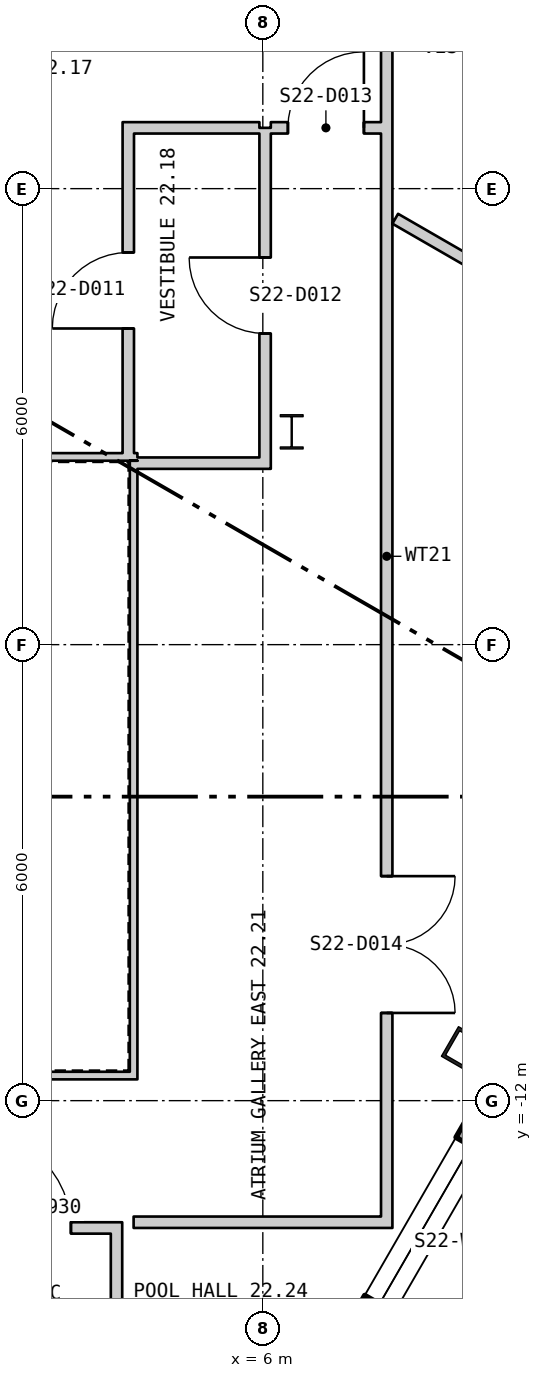
"""IFC4 building model, lengths in metres.
Left out: names, types, materials, properties, quantities, classifications, styles, units other than length and angle.
Written with IfcOpenShell. Run it as: python <this file> out.ifc"""

import sys

from ifc_helpers import new_model, si_unit, direction, frame, frame_2d, origin, origin_2d, place, context, subcontext, project, spatial, polyline, rectangle, hollow_rectangle, i_section, outline, extrude, element, fill, save


model = new_model("IFC4")
c1 = context("Model", 3, precision=1e-05, world=origin(), true_north=direction((0.0, 1.0)))
c2 = subcontext(c1, "Body", "Model", "MODEL_VIEW")
j1 = project(units=[si_unit("LENGTHUNIT", "METRE"), si_unit("PLANEANGLEUNIT", "RADIAN")], contexts=[c1])
p1 = place(None, origin())
s1 = spatial("IfcSite", under=j1, at=p1, CompositionType="ELEMENT")
p2 = place(p1, origin())
s2 = spatial("IfcBuilding", under=s1, at=p2, CompositionType="ELEMENT")
p3 = place(p2, frame((0.0, 0.0, 298.2)))
s3 = spatial("IfcBuildingStorey", under=s2, at=p3, CompositionType="ELEMENT", Elevation=298.2)
p4 = place(p3, frame((8.765, -11.396, 0.0), z_axis=(0.0, 0.0, 1.0), x_axis=(0.5, 0.866025403784, 0.0)))
e1 = element("IfcColumn", 1, at=p4, inside=s3, PredefinedType="COLUMN", context=c2, shape_type="SweptSolid", body=[
    extrude(hollow_rectangle(XDim=0.45, YDim=0.7, WallThickness=0.04, at=origin_2d()), origin(), (0.0, 0.0, 1.0), 6.0),
])
p5 = place(p3, frame((6.38, -3.2, 0.0), z_axis=(0.0, 0.0, 1.0), x_axis=(1.0, 0.0, 0.0)))
e2 = element("IfcColumn", 2, at=p5, inside=s3, PredefinedType="COLUMN", context=c2, shape_type="SweptSolid", body=[
    extrude(i_section(OverallWidth=0.3, OverallDepth=0.45, WebThickness=0.014, FlangeThickness=0.026, at=origin_2d()), origin(), (0.0, 0.0, 1.0), 6.0),
])
p6 = place(p3, frame((2.335, -23.682, -0.28), z_axis=(0.0, 0.0, 1.0), x_axis=(0.499999764979, 0.866025539474, 0.0)))
e3 = element("IfcWall", 3, at=p6, inside=s3, PredefinedType="SOLIDWALL", context=c2, shape_type="SweptSolid", body=[
    extrude(outline(polyline([(-0.13, -0.225), (45.87, -0.225), (45.61, 0.225), (0.13, 0.225), (-0.13, -0.225)])), origin(), (0.0, 0.0, 1.0), 6.1),
])
p7 = place(p6, frame((1.424, 0.0, 1.18)))
e4 = element("IfcOpeningElement", 4, at=p7, cuts=e3, PredefinedType="OPENING", context=c2, shape_type="SweptSolid", body=[
    extrude(rectangle(XDim=2.4, YDim=4.1, at=frame_2d((1.2, 2.05))), frame((0.0, 0.235, 0.0), z_axis=(0.0, -1.0, 0.0), x_axis=(1.0, 0.0, 0.0)), (0.0, 0.0, 1.0), 0.47),
])
p8 = place(p6, frame((5.893, 0.0, 1.18)))
e5 = element("IfcOpeningElement", 5, at=p8, cuts=e3, PredefinedType="OPENING", context=c2, shape_type="SweptSolid", body=[
    extrude(rectangle(XDim=2.4, YDim=4.1, at=frame_2d((1.2, 2.05))), frame((0.0, 0.235, 0.0), z_axis=(0.0, -1.0, 0.0), x_axis=(1.0, 0.0, 0.0)), (0.0, 0.0, 1.0), 0.47),
])
p9 = place(p6, frame((10.401, 0.0, 1.18)))
e6 = element("IfcOpeningElement", 6, at=p9, cuts=e3, PredefinedType="OPENING", context=c2, shape_type="SweptSolid", body=[
    extrude(rectangle(XDim=2.4, YDim=4.1, at=frame_2d((1.2, 2.05))), frame((0.0, 0.235, 0.0), z_axis=(0.0, -1.0, 0.0), x_axis=(1.0, 0.0, 0.0)), (0.0, 0.0, 1.0), 0.47),
])
p10 = place(p6, frame((14.909, 0.0, 1.18)))
e7 = element("IfcOpeningElement", 7, at=p10, cuts=e3, PredefinedType="OPENING", context=c2, shape_type="SweptSolid", body=[
    extrude(rectangle(XDim=2.4, YDim=4.1, at=frame_2d((1.2, 2.05))), frame((0.0, 0.235, 0.0), z_axis=(0.0, -1.0, 0.0), x_axis=(1.0, 0.0, 0.0)), (0.0, 0.0, 1.0), 0.47),
])
p11 = place(p6, frame((19.716, 0.0, 0.28)))
e8 = element("IfcOpeningElement", 8, at=p11, cuts=e3, PredefinedType="OPENING", context=c2, shape_type="SweptSolid", body=[
    extrude(rectangle(XDim=1.8, YDim=2.4, at=frame_2d((0.9, 1.2))), frame((0.0, 0.235, 0.0), z_axis=(0.0, -1.0, 0.0), x_axis=(1.0, 0.0, 0.0)), (0.0, 0.0, 1.0), 0.47),
])
p12 = place(p6, frame((24.224, 0.0, 0.28)))
e9 = element("IfcOpeningElement", 9, at=p12, cuts=e3, PredefinedType="OPENING", context=c2, shape_type="SweptSolid", body=[
    extrude(rectangle(XDim=1.8, YDim=2.4, at=frame_2d((0.9, 1.2))), frame((0.0, 0.235, 0.0), z_axis=(0.0, -1.0, 0.0), x_axis=(1.0, 0.0, 0.0)), (0.0, 0.0, 1.0), 0.47),
])
p13 = place(p6, frame((28.431, 0.0, 1.18)))
e10 = element("IfcOpeningElement", 10, at=p13, cuts=e3, PredefinedType="OPENING", context=c2, shape_type="SweptSolid", body=[
    extrude(rectangle(XDim=2.4, YDim=4.1, at=frame_2d((1.2, 2.05))), frame((0.0, 0.235, 0.0), z_axis=(0.0, -1.0, 0.0), x_axis=(1.0, 0.0, 0.0)), (0.0, 0.0, 1.0), 0.47),
])
p14 = place(p6, frame((32.939, 0.0, 1.18)))
e11 = element("IfcOpeningElement", 11, at=p14, cuts=e3, PredefinedType="OPENING", context=c2, shape_type="SweptSolid", body=[
    extrude(rectangle(XDim=2.4, YDim=4.1, at=frame_2d((1.2, 2.05))), frame((0.0, 0.235, 0.0), z_axis=(0.0, -1.0, 0.0), x_axis=(1.0, 0.0, 0.0)), (0.0, 0.0, 1.0), 0.47),
])
p15 = place(p6, frame((37.447, 0.0, 1.18)))
e12 = element("IfcOpeningElement", 12, at=p15, cuts=e3, PredefinedType="OPENING", context=c2, shape_type="SweptSolid", body=[
    extrude(rectangle(XDim=2.4, YDim=4.1, at=frame_2d((1.2, 2.05))), frame((0.0, 0.235, 0.0), z_axis=(0.0, -1.0, 0.0), x_axis=(1.0, 0.0, 0.0)), (0.0, 0.0, 1.0), 0.47),
])
p16 = place(p6, frame((41.916, 0.0, 1.18)))
e13 = element("IfcOpeningElement", 13, at=p16, cuts=e3, PredefinedType="OPENING", context=c2, shape_type="SweptSolid", body=[
    extrude(rectangle(XDim=2.4, YDim=4.1, at=frame_2d((1.2, 2.05))), frame((0.0, 0.235, 0.0), z_axis=(0.0, -1.0, 0.0), x_axis=(1.0, 0.0, 0.0)), (0.0, 0.0, 1.0), 0.47),
])
p17 = place(p3, frame((-4.35, -11.67, 0.0), z_axis=(0.0, 0.0, 1.0), x_axis=(1.0, 0.0, 0.0)))
e14 = element("IfcWall", 14, at=p17, inside=s3, PredefinedType="PARTITIONING", context=c2, shape_type="SweptSolid", body=[
    extrude(rectangle(XDim=8.7, YDim=0.1, at=frame_2d((4.35, 0.0))), origin(), (0.0, 0.0, 1.0), 5.8),
])
p18 = place(p3, frame((4.3, -11.62, 0.0), z_axis=(0.0, 0.0, 1.0), x_axis=(0.0, 1.0, 0.0)))
e15 = element("IfcWall", 15, at=p18, inside=s3, PredefinedType="PARTITIONING", context=c2, shape_type="SweptSolid", body=[
    extrude(rectangle(XDim=8.04, YDim=0.1, at=frame_2d((4.02, 0.0))), origin(), (0.0, 0.0, 1.0), 5.8),
])
p19 = place(p3, frame((4.35, -3.53, 0.0), z_axis=(0.0, 0.0, 1.0), x_axis=(-1.0, 0.0, 0.0)))
e16 = element("IfcWall", 16, at=p19, inside=s3, PredefinedType="PARTITIONING", context=c2, shape_type="SweptSolid", body=[
    extrude(rectangle(XDim=8.7, YDim=0.1, at=frame_2d((4.35, 0.0))), origin(), (0.0, 0.0, 1.0), 5.8),
])
p20 = place(p3, frame((4.075, -16.15, 0.0), z_axis=(0.0, 0.0, 1.0), x_axis=(0.0, 1.0, 0.0)))
e17 = element("IfcWall", 17, at=p20, inside=s3, PredefinedType="PARTITIONING", context=c2, shape_type="SweptSolid", body=[
    extrude(rectangle(XDim=2.4, YDim=0.15, at=frame_2d((1.2, 0.0))), origin(), (0.0, 0.0, 1.0), 5.8),
])
p21 = place(p3, frame((1.55, -13.675, 0.0), z_axis=(0.0, 0.0, 1.0), x_axis=(1.0, 0.0, 0.0)))
e18 = element("IfcWall", 18, at=p21, inside=s3, PredefinedType="PARTITIONING", context=c2, shape_type="SweptSolid", body=[
    extrude(rectangle(XDim=2.6, YDim=0.15, at=frame_2d((1.3, 0.0))), origin(), (0.0, 0.0, 1.0), 4.986),
])
p22 = place(p21, frame((0.675, 0.0, 0.0)))
e19 = element("IfcOpeningElement", 19, at=p22, cuts=e18, PredefinedType="OPENING", context=c2, shape_type="SweptSolid", body=[
    extrude(rectangle(XDim=1.25, YDim=2.1, at=frame_2d((0.625, 1.05))), frame((0.0, 0.085, 0.0), z_axis=(0.0, -1.0, 0.0), x_axis=(1.0, 0.0, 0.0)), (0.0, 0.0, 1.0), 0.17),
])
p23 = place(p3, frame((4.23, -3.48, 0.0), z_axis=(0.0, 0.0, 1.0), x_axis=(0.0, 1.0, 0.0)))
e20 = element("IfcWall", 20, at=p23, inside=s3, PredefinedType="PARTITIONING", context=c2, shape_type="SweptSolid", body=[
    extrude(rectangle(XDim=4.355, YDim=0.15, at=frame_2d((2.178, 0.0))), origin(), (0.0, 0.0, 1.0), 5.8),
])
p24 = place(p23, frame((1.64, 0.0, 0.0)))
e21 = element("IfcOpeningElement", 21, at=p24, cuts=e20, PredefinedType="OPENING", context=c2, shape_type="SweptSolid", body=[
    extrude(rectangle(XDim=1.0, YDim=2.1, at=frame_2d((0.5, 1.05))), frame((0.0, 0.085, 0.0), z_axis=(0.0, -1.0, 0.0), x_axis=(1.0, 0.0, 0.0)), (0.0, 0.0, 1.0), 0.17),
])
p25 = place(p3, frame((4.3, -13.6, 0.0), z_axis=(0.0, 0.0, 1.0), x_axis=(1.0, 0.0, 0.0)))
e22 = element("IfcWall", 22, at=p25, inside=s3, PredefinedType="PARTITIONING", context=c2, shape_type="SweptSolid", body=[
    extrude(rectangle(XDim=2.775, YDim=0.15, at=frame_2d((1.387, 0.0))), origin(), (0.0, 0.0, 1.0), 4.986),
])
p26 = place(p3, frame((7.075, -13.6, 0.0), z_axis=(0.0, 0.0, 1.0), x_axis=(1.0, 0.0, 0.0)))
e23 = element("IfcWall", 23, at=p26, inside=s3, PredefinedType="PARTITIONING", context=c2, shape_type="SweptSolid", body=[
    extrude(rectangle(XDim=0.48, YDim=0.15, at=frame_2d((0.24, 0.0))), origin(), (0.0, 0.0, 1.0), 5.8),
])
p27 = place(p3, frame((4.305, 0.8, 0.0), z_axis=(0.0, 0.0, 1.0), x_axis=(1.0, 0.0, 0.0)))
e24 = element("IfcWall", 24, at=p27, inside=s3, PredefinedType="PARTITIONING", context=c2, shape_type="SweptSolid", body=[
    extrude(rectangle(XDim=1.65, YDim=0.15, at=frame_2d((0.825, 0.0))), origin(), (0.0, 0.0, 1.0), 5.8),
])
p28 = place(p3, frame((4.35, -3.612, 0.0), z_axis=(0.0, 0.0, 1.0), x_axis=(1.0, 0.0, 0.0)))
e25 = element("IfcWall", 25, at=p28, inside=s3, PredefinedType="PARTITIONING", context=c2, shape_type="SweptSolid", body=[
    extrude(rectangle(XDim=1.605, YDim=0.15, at=frame_2d((0.802, 0.0))), origin(), (0.0, 0.0, 1.0), 5.8),
])
p29 = place(p3, frame((6.03, -3.687, 0.0), z_axis=(0.0, 0.0, 1.0), x_axis=(0.0, 1.0, 0.0)))
e26 = element("IfcWall", 26, at=p29, inside=s3, PredefinedType="PARTITIONING", context=c2, shape_type="SweptSolid", body=[
    extrude(rectangle(XDim=4.487, YDim=0.15, at=frame_2d((2.244, 0.0))), origin(), (0.0, 0.0, 1.0), 5.8),
])
p30 = place(p29, frame((1.781, 0.0, 0.0)))
e27 = element("IfcOpeningElement", 27, at=p30, cuts=e26, PredefinedType="OPENING", context=c2, shape_type="SweptSolid", body=[
    extrude(rectangle(XDim=1.0, YDim=2.1, at=frame_2d((0.5, 1.05))), frame((0.0, 0.085, 0.0), z_axis=(0.0, -1.0, 0.0), x_axis=(1.0, 0.0, 0.0)), (0.0, 0.0, 1.0), 0.17),
])
p31 = place(p3, frame((6.105, 0.8, 0.0), z_axis=(0.0, 0.0, 1.0), x_axis=(1.0, 0.0, 0.0)))
e28 = element("IfcWall", 28, at=p31, inside=s3, PredefinedType="PARTITIONING", context=c2, shape_type="SweptSolid", body=[
    extrude(rectangle(XDim=1.45, YDim=0.15, at=frame_2d((0.725, 0.0))), origin(), (0.0, 0.0, 1.0), 5.8),
])
p32 = place(p31, frame((0.225, 0.0, 0.0)))
e29 = element("IfcOpeningElement", 29, at=p32, cuts=e28, PredefinedType="OPENING", context=c2, shape_type="SweptSolid", body=[
    extrude(rectangle(XDim=1.0, YDim=2.1, at=frame_2d((0.5, 1.05))), frame((0.0, 0.085, 0.0), z_axis=(0.0, -1.0, 0.0), x_axis=(1.0, 0.0, 0.0)), (0.0, 0.0, 1.0), 0.17),
])
p33 = place(p3, frame((7.63, -13.675, 0.0), z_axis=(0.0, 0.0, 1.0), x_axis=(0.0, 1.0, 0.0)))
e30 = element("IfcWall", 30, at=p33, inside=s3, PredefinedType="PARTITIONING", context=c2, shape_type="SweptSolid", body=[
    extrude(rectangle(XDim=17.675, YDim=0.15, at=frame_2d((8.838, 0.0))), origin(), (0.0, 0.0, 1.0), 5.8),
])
p34 = place(p33, frame((2.829, 0.0, 0.0)))
e31 = element("IfcOpeningElement", 31, at=p34, cuts=e30, PredefinedType="OPENING", context=c2, shape_type="SweptSolid", body=[
    extrude(rectangle(XDim=1.8, YDim=2.1, at=frame_2d((0.9, 1.05))), frame((0.0, 0.085, 0.0), z_axis=(0.0, -1.0, 0.0), x_axis=(1.0, 0.0, 0.0)), (0.0, 0.0, 1.0), 0.17),
])
p35 = place(p33, frame((16.275, 0.0, 0.0)))
e32 = element("IfcOpeningElement", 32, at=p35, cuts=e30, PredefinedType="OPENING", context=c2, shape_type="SweptSolid", body=[
    extrude(rectangle(XDim=1.0, YDim=2.1, at=frame_2d((0.5, 1.05))), frame((0.0, 0.085, 0.0), z_axis=(0.0, -1.0, 0.0), x_axis=(1.0, 0.0, 0.0)), (0.0, 0.0, 1.0), 0.17),
])
p36 = place(p3, frame((7.742, -0.396, 0.0), z_axis=(0.0, 0.0, 1.0), x_axis=(0.866169692731, -0.499750000894, 0.0)))
e33 = element("IfcWall", 33, at=p36, inside=s3, PredefinedType="PARTITIONING", context=c2, shape_type="SweptSolid", body=[
    extrude(rectangle(XDim=6.285, YDim=0.15, at=frame_2d((3.143, 0.0))), origin(), (0.0, 0.0, 1.0), 5.8),
])
p37 = place(p9, origin())
e34 = element("IfcWindow", 34, at=p37, inside=s3, PartitioningType="SINGLE_PANEL", PredefinedType="WINDOW", context=c2, shape_type="SweptSolid", body=[
    extrude(rectangle(XDim=2.4, YDim=4.1, at=frame_2d((1.2, 2.05))), frame((0.0, 0.105, 0.0), z_axis=(0.0, -1.0, 0.0), x_axis=(1.0, 0.0, 0.0)), (0.0, 0.0, 1.0), 0.06),
])
fill(e6, e34)
p38 = place(p22, origin())
e35 = element("IfcDoor", 35, at=p38, inside=s3, OperationType="SINGLE_SWING_RIGHT", PredefinedType="DOOR", context=c2, shape_type="SweptSolid", body=[
    extrude(rectangle(XDim=1.25, YDim=2.1, at=frame_2d((0.625, 1.05))), frame((0.0, 0.025, 0.0), z_axis=(0.0, -1.0, 0.0), x_axis=(1.0, 0.0, 0.0)), (0.0, 0.0, 1.0), 0.05),
])
fill(e19, e35)
p39 = place(p24, origin())
e36 = element("IfcDoor", 36, at=p39, inside=s3, OperationType="SINGLE_SWING_RIGHT", PredefinedType="DOOR", context=c2, shape_type="SweptSolid", body=[
    extrude(rectangle(XDim=1.0, YDim=2.1, at=frame_2d((0.5, 1.05))), frame((0.0, 0.025, 0.0), z_axis=(0.0, -1.0, 0.0), x_axis=(1.0, 0.0, 0.0)), (0.0, 0.0, 1.0), 0.05),
])
fill(e21, e36)
p40 = place(p30, origin())
e37 = element("IfcDoor", 37, at=p40, inside=s3, OperationType="SINGLE_SWING_LEFT", PredefinedType="DOOR", context=c2, shape_type="SweptSolid", body=[
    extrude(rectangle(XDim=1.0, YDim=2.1, at=frame_2d((0.5, 1.05))), frame((0.0, 0.025, 0.0), z_axis=(0.0, -1.0, 0.0), x_axis=(1.0, 0.0, 0.0)), (0.0, 0.0, 1.0), 0.05),
])
fill(e27, e37)
p41 = place(p32, origin())
e38 = element("IfcDoor", 38, at=p41, inside=s3, OperationType="SINGLE_SWING_LEFT", PredefinedType="DOOR", context=c2, shape_type="SweptSolid", body=[
    extrude(rectangle(XDim=1.0, YDim=2.1, at=frame_2d((0.5, 1.05))), frame((0.0, 0.025, 0.0), z_axis=(0.0, -1.0, 0.0), x_axis=(1.0, 0.0, 0.0)), (0.0, 0.0, 1.0), 0.05),
])
fill(e29, e38)
p42 = place(p34, origin())
e39 = element("IfcDoor", 39, at=p42, inside=s3, OperationType="DOUBLE_DOOR_SINGLE_SWING", PredefinedType="DOOR", context=c2, shape_type="SweptSolid", body=[
    extrude(rectangle(XDim=1.8, YDim=2.1, at=frame_2d((0.9, 1.05))), frame((0.0, 0.025, 0.0), z_axis=(0.0, -1.0, 0.0), x_axis=(1.0, 0.0, 0.0)), (0.0, 0.0, 1.0), 0.05),
])
fill(e31, e39)
save(model, sys.argv[1])
